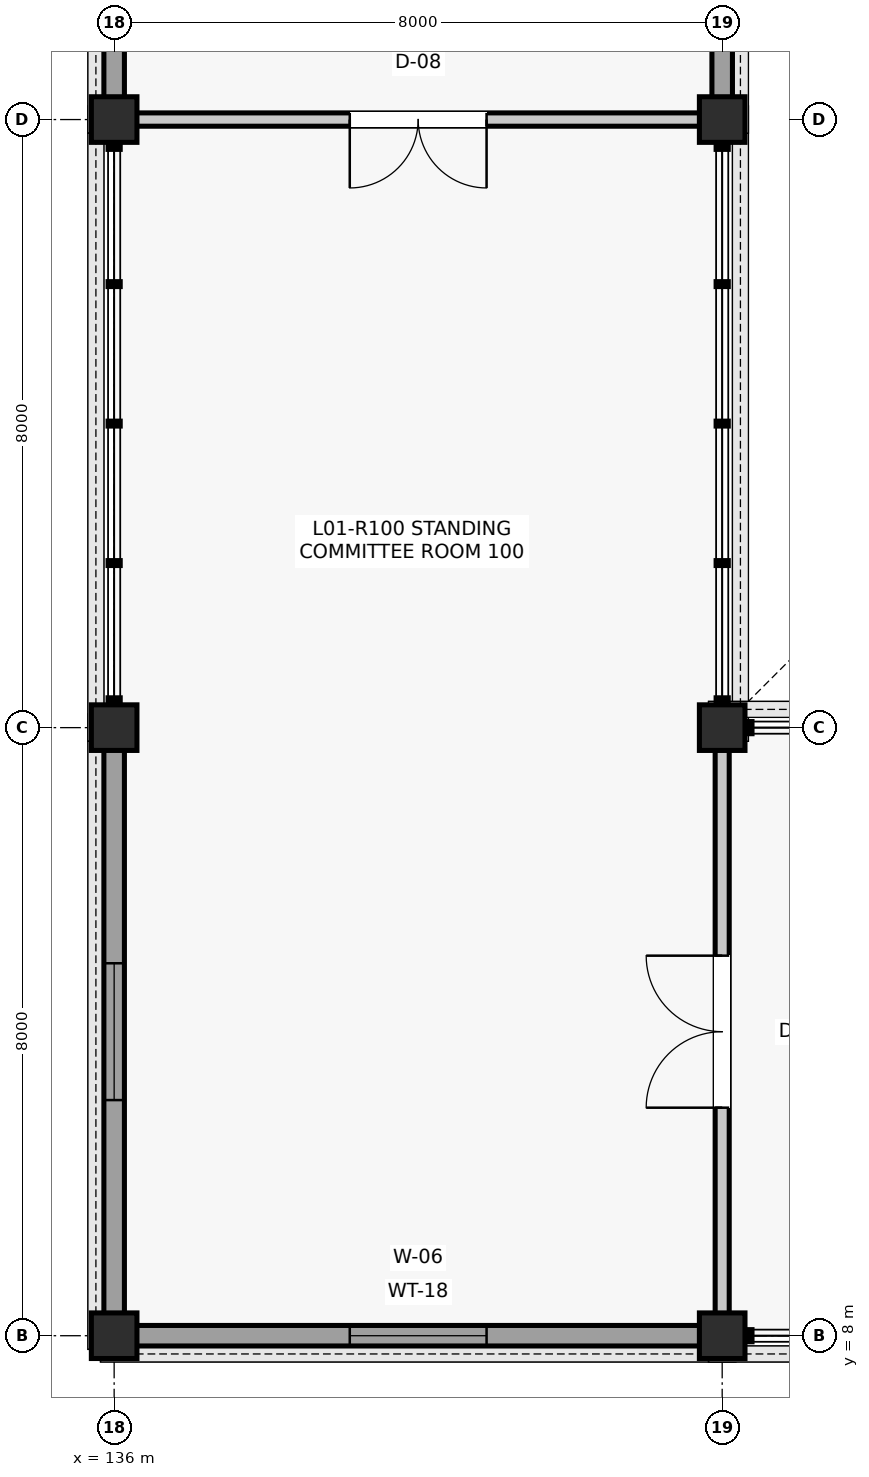
"""IFC4 building model, lengths in metres.
Left out: names, types, materials, properties, quantities, classifications, styles, units other than length and angle.
Written with IfcOpenShell. Run it as: python <this file> out.ifc"""

import sys

from ifc_helpers import new_model, si_unit, direction, frame, frame_2d, origin, origin_2d, place, context, subcontext, project, spatial, rectangle, extrude, element, fill, save


model = new_model("IFC4")
c1 = context("Model", 3, precision=1e-05, world=origin(), true_north=direction((0.0, 1.0)))
c2 = subcontext(c1, "Body", "Model", "MODEL_VIEW")
j1 = project(units=[si_unit("LENGTHUNIT", "METRE"), si_unit("PLANEANGLEUNIT", "RADIAN")], contexts=[c1])
p1 = place(None, origin())
s1 = spatial("IfcSite", under=j1, at=p1, CompositionType="ELEMENT")
p2 = place(p1, origin())
s2 = spatial("IfcBuilding", under=s1, at=p2, CompositionType="ELEMENT")
p3 = place(p2, frame((0.0, 0.0, 5.28)))
s3 = spatial("IfcBuildingStorey", under=s2, at=p3, CompositionType="ELEMENT", Elevation=5.28)
for number, where, z_axis, x_axis in (
    (1, (136.0, 8.0, 0.0), (0.0, 0.0, 1.0), (1.0, 0.0, 0.0)),
    (2, (136.0, 16.0, 0.0), (0.0, 0.0, 1.0), (1.0, 0.0, 0.0)),
    (3, (136.0, 24.0, 0.0), (0.0, 0.0, 1.0), (1.0, 0.0, 0.0)),
    (4, (144.0, 8.0, 0.0), (0.0, 0.0, 1.0), (1.0, 0.0, 0.0)),
    (5, (144.0, 16.0, 0.0), (0.0, 0.0, 1.0), (1.0, 0.0, 0.0)),
    (6, (144.0, 24.0, 0.0), (0.0, 0.0, 1.0), (1.0, 0.0, 0.0)),
):
    element("IfcColumn", number, at=place(p3, frame(where, z_axis=z_axis, x_axis=x_axis)), inside=s3, PredefinedType="COLUMN", context=c2, shape_type="SweptSolid", body=[
        extrude(rectangle(XDim=0.6, YDim=0.6, at=origin_2d()), origin(), (0.0, 0.0, 1.0), 4.62),
    ])
p4 = place(p3, frame((136.285, 8.0, 0.0), z_axis=(0.0, 0.0, 1.0), x_axis=(1.0, 0.0, 0.0)))
e7 = element("IfcWall", 7, at=p4, inside=s3, PredefinedType="SOLIDWALL", context=c2, shape_type="SweptSolid", body=[
    extrude(rectangle(XDim=7.43, YDim=0.27, at=frame_2d((3.715, 0.0))), origin(), (0.0, 0.0, 1.0), 3.977),
])
p5 = place(p4, frame((2.815, 0.0, 0.9)))
e8 = element("IfcOpeningElement", 8, at=p5, cuts=e7, PredefinedType="OPENING", context=c2, shape_type="SweptSolid", body=[
    extrude(rectangle(XDim=1.8, YDim=2.3, at=frame_2d((0.9, 1.15))), frame((0.0, 0.145, 0.0), z_axis=(0.0, -1.0, 0.0), x_axis=(1.0, 0.0, 0.0)), (0.0, 0.0, 1.0), 0.29),
])
p6 = place(p3, frame((136.0, 8.285, 0.0), z_axis=(0.0, 0.0, 1.0), x_axis=(0.0, 1.0, 0.0)))
e9 = element("IfcWall", 9, at=p6, inside=s3, PredefinedType="SOLIDWALL", context=c2, shape_type="SweptSolid", body=[
    extrude(rectangle(XDim=7.43, YDim=0.27, at=frame_2d((3.715, 0.0))), origin(), (0.0, 0.0, 1.0), 3.977),
])
p7 = place(p6, frame((2.815, 0.0, 0.9)))
e10 = element("IfcOpeningElement", 10, at=p7, cuts=e9, PredefinedType="OPENING", context=c2, shape_type="SweptSolid", body=[
    extrude(rectangle(XDim=1.8, YDim=2.3, at=frame_2d((0.9, 1.15))), frame((0.0, 0.145, 0.0), z_axis=(0.0, -1.0, 0.0), x_axis=(1.0, 0.0, 0.0)), (0.0, 0.0, 1.0), 0.29),
])
p8 = place(p3, frame((136.0, 24.285, 0.0), z_axis=(0.0, 0.0, 1.0), x_axis=(0.0, 1.0, 0.0)))
e11 = element("IfcWall", 11, at=p8, inside=s3, PredefinedType="SOLIDWALL", context=c2, shape_type="SweptSolid", body=[
    extrude(rectangle(XDim=7.43, YDim=0.27, at=frame_2d((3.715, 0.0))), origin(), (0.0, 0.0, 1.0), 3.974),
])
p9 = place(p8, frame((0.698, 0.0, 0.95)))
e12 = element("IfcOpeningElement", 12, at=p9, cuts=e11, PredefinedType="OPENING", context=c2, shape_type="SweptSolid", body=[
    extrude(rectangle(XDim=1.28, YDim=1.72, at=frame_2d((0.64, 0.86))), frame((0.0, 0.145, 0.0), z_axis=(0.0, -1.0, 0.0), x_axis=(1.0, 0.0, 0.0)), (0.0, 0.0, 1.0), 0.29),
])
p10 = place(p8, frame((5.453, 0.0, 0.95)))
e13 = element("IfcOpeningElement", 13, at=p10, cuts=e11, PredefinedType="OPENING", context=c2, shape_type="SweptSolid", body=[
    extrude(rectangle(XDim=1.28, YDim=1.72, at=frame_2d((0.64, 0.86))), frame((0.0, 0.145, 0.0), z_axis=(0.0, -1.0, 0.0), x_axis=(1.0, 0.0, 0.0)), (0.0, 0.0, 1.0), 0.29),
])
p11 = place(p3, frame((144.0, 24.285, 0.0), z_axis=(0.0, 0.0, 1.0), x_axis=(0.0, 1.0, 0.0)))
e14 = element("IfcWall", 14, at=p11, inside=s3, PredefinedType="SOLIDWALL", context=c2, shape_type="SweptSolid", body=[
    extrude(rectangle(XDim=7.43, YDim=0.27, at=frame_2d((3.715, 0.0))), origin(), (0.0, 0.0, 1.0), 3.864),
])
p12 = place(p11, frame((0.698, 0.0, 0.95)))
e15 = element("IfcOpeningElement", 15, at=p12, cuts=e14, PredefinedType="OPENING", context=c2, shape_type="SweptSolid", body=[
    extrude(rectangle(XDim=1.28, YDim=1.72, at=frame_2d((0.64, 0.86))), frame((0.0, 0.145, 0.0), z_axis=(0.0, -1.0, 0.0), x_axis=(1.0, 0.0, 0.0)), (0.0, 0.0, 1.0), 0.29),
])
p13 = place(p11, frame((5.453, 0.0, 0.95)))
e16 = element("IfcOpeningElement", 16, at=p13, cuts=e14, PredefinedType="OPENING", context=c2, shape_type="SweptSolid", body=[
    extrude(rectangle(XDim=1.28, YDim=1.72, at=frame_2d((0.64, 0.86))), frame((0.0, 0.145, 0.0), z_axis=(0.0, -1.0, 0.0), x_axis=(1.0, 0.0, 0.0)), (0.0, 0.0, 1.0), 0.29),
])
p14 = place(p3, frame((144.0, 8.29, 0.0), z_axis=(0.0, 0.0, 1.0), x_axis=(0.0, 1.0, 0.0)))
e17 = element("IfcWall", 17, at=p14, inside=s3, PredefinedType="PARTITIONING", context=c2, shape_type="SweptSolid", body=[
    extrude(rectangle(XDim=7.42, YDim=0.185, at=frame_2d((3.71, 0.0))), origin(), (0.0, 0.0, 1.0), 3.851),
])
p15 = place(p14, frame((2.71, 0.0, 0.0)))
e18 = element("IfcOpeningElement", 18, at=p15, cuts=e17, PredefinedType="OPENING", context=c2, shape_type="SweptSolid", body=[
    extrude(rectangle(XDim=2.0, YDim=2.4, at=frame_2d((1.0, 1.2))), frame((0.0, 0.103, 0.0), z_axis=(0.0, -1.0, 0.0), x_axis=(1.0, 0.0, 0.0)), (0.0, 0.0, 1.0), 0.205),
])
p16 = place(p3, frame((136.29, 24.0, 0.0), z_axis=(0.0, 0.0, 1.0), x_axis=(1.0, 0.0, 0.0)))
e19 = element("IfcWall", 19, at=p16, inside=s3, PredefinedType="PARTITIONING", context=c2, shape_type="SweptSolid", body=[
    extrude(rectangle(XDim=7.42, YDim=0.175, at=frame_2d((3.71, 0.0))), origin(), (0.0, 0.0, 1.0), 3.712),
])
p17 = place(p16, frame((2.81, 0.0, 0.0)))
e20 = element("IfcOpeningElement", 20, at=p17, cuts=e19, PredefinedType="OPENING", context=c2, shape_type="SweptSolid", body=[
    extrude(rectangle(XDim=1.8, YDim=2.35, at=frame_2d((0.9, 1.175))), frame((0.0, 0.097, 0.0), z_axis=(0.0, -1.0, 0.0), x_axis=(1.0, 0.0, 0.0)), (0.0, 0.0, 1.0), 0.195),
])
p18 = place(p5, origin())
e21 = element("IfcWindow", 21, at=p18, inside=s3, PartitioningType="SINGLE_PANEL", PredefinedType="WINDOW", context=c2, shape_type="SweptSolid", body=[
    extrude(rectangle(XDim=1.8, YDim=2.3, at=frame_2d((0.9, 1.15))), frame((0.0, 0.03, 0.0), z_axis=(0.0, -1.0, 0.0), x_axis=(1.0, 0.0, 0.0)), (0.0, 0.0, 1.0), 0.06),
])
fill(e8, e21)
p19 = place(p7, origin())
e22 = element("IfcWindow", 22, at=p19, inside=s3, PartitioningType="SINGLE_PANEL", PredefinedType="WINDOW", context=c2, shape_type="SweptSolid", body=[
    extrude(rectangle(XDim=1.8, YDim=2.3, at=frame_2d((0.9, 1.15))), frame((0.0, 0.03, 0.0), z_axis=(0.0, -1.0, 0.0), x_axis=(1.0, 0.0, 0.0)), (0.0, 0.0, 1.0), 0.06),
])
fill(e10, e22)
p20 = place(p15, origin())
e23 = element("IfcDoor", 23, at=p20, inside=s3, OperationType="DOUBLE_DOOR_SINGLE_SWING", PredefinedType="DOOR", context=c2, shape_type="SweptSolid", body=[
    extrude(rectangle(XDim=2.0, YDim=2.4, at=frame_2d((1.0, 1.2))), frame((0.0, 0.025, 0.0), z_axis=(0.0, -1.0, 0.0), x_axis=(1.0, 0.0, 0.0)), (0.0, 0.0, 1.0), 0.05),
])
fill(e18, e23)
p21 = place(p17, frame((1.8, 0.0, 0.0), z_axis=(0.0, 0.0, 1.0), x_axis=(-1.0, 0.0, 0.0)))
e24 = element("IfcDoor", 24, at=p21, inside=s3, OperationType="DOUBLE_DOOR_SINGLE_SWING", PredefinedType="DOOR", context=c2, shape_type="SweptSolid", body=[
    extrude(rectangle(XDim=1.8, YDim=2.35, at=frame_2d((0.9, 1.175))), frame((0.0, 0.025, 0.0), z_axis=(0.0, -1.0, 0.0), x_axis=(1.0, 0.0, 0.0)), (0.0, 0.0, 1.0), 0.05),
])
fill(e20, e24)
save(model, sys.argv[1])
